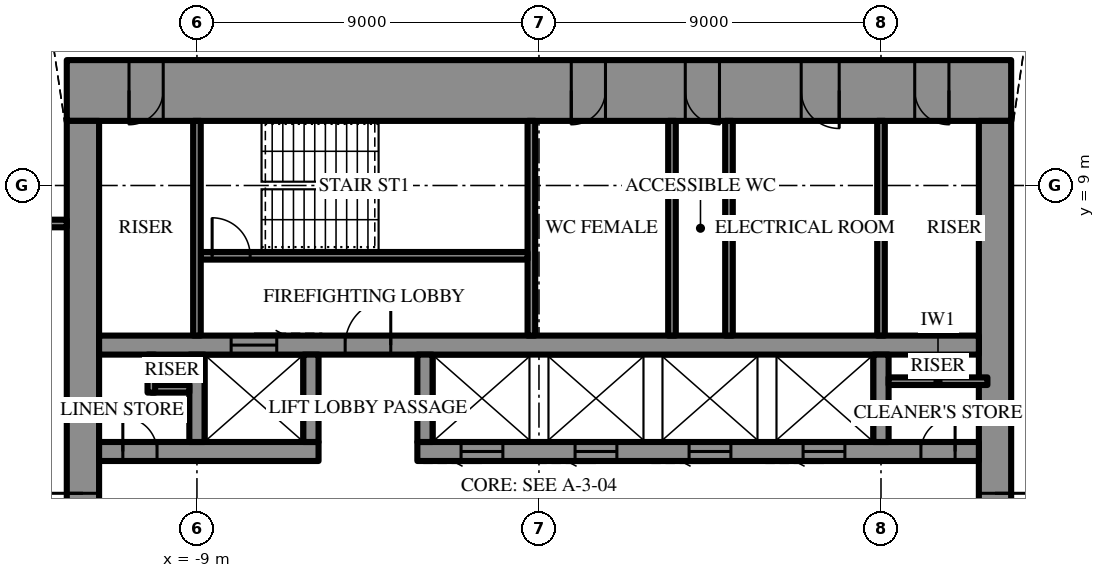
"""IFC4 building model, lengths in metres.
Left out: names, types, materials, properties, quantities, classifications, styles, units other than length and angle.
Written with IfcOpenShell. Run it as: python <this file> out.ifc"""

import sys

from ifc_helpers import new_model, si_unit, direction, frame, frame_2d, origin, place, context, subcontext, project, spatial, rectangle, extrude, element, fill, save


model = new_model("IFC4")
c1 = context("Model", 3, precision=1e-05, world=origin(), true_north=direction((0.0, 1.0)))
c2 = subcontext(c1, "Body", "Model", "MODEL_VIEW")
j1 = project(units=[si_unit("LENGTHUNIT", "METRE"), si_unit("PLANEANGLEUNIT", "RADIAN")], contexts=[c1])
p1 = place(None, origin())
s1 = spatial("IfcSite", under=j1, at=p1, CompositionType="ELEMENT")
p2 = place(p1, origin())
s2 = spatial("IfcBuilding", under=s1, at=p2, CompositionType="ELEMENT")
p3 = place(p2, frame((0.0, 0.0, 382.9)))
s3 = spatial("IfcBuildingStorey", under=s2, at=p3, CompositionType="ELEMENT", Elevation=382.9)
p4 = place(p3, frame((-12.425, 11.5, 0.0), z_axis=(0.0, 0.0, 1.0), x_axis=(1.0, 0.0, 0.0)))
e1 = element("IfcWall", 1, at=p4, inside=s3, PredefinedType="SHEAR", context=c2, shape_type="SweptSolid", body=[
    extrude(rectangle(XDim=24.85, YDim=1.6, at=frame_2d((12.425, 0.0))), origin(), (0.0, 0.0, 1.0), 4.2),
])
p5 = place(p4, frame((13.275, 0.0, 0.0)))
e2 = element("IfcOpeningElement", 2, at=p5, cuts=e1, PredefinedType="OPENING", context=c2, shape_type="SweptSolid", body=[
    extrude(rectangle(XDim=0.9, YDim=2.2, at=frame_2d((0.45, 1.1))), frame((0.0, 0.81, 0.0), z_axis=(0.0, -1.0, 0.0), x_axis=(1.0, 0.0, 0.0)), (0.0, 0.0, 1.0), 1.62),
])
p6 = place(p4, frame((16.275, 0.0, 0.0)))
e3 = element("IfcOpeningElement", 3, at=p6, cuts=e1, PredefinedType="OPENING", context=c2, shape_type="SweptSolid", body=[
    extrude(rectangle(XDim=0.9, YDim=2.2, at=frame_2d((0.45, 1.1))), frame((0.0, 0.81, 0.0), z_axis=(0.0, -1.0, 0.0), x_axis=(1.0, 0.0, 0.0)), (0.0, 0.0, 1.0), 1.62),
])
p7 = place(p4, frame((19.325, 0.0, 0.0)))
e4 = element("IfcOpeningElement", 4, at=p7, cuts=e1, PredefinedType="OPENING", context=c2, shape_type="SweptSolid", body=[
    extrude(rectangle(XDim=1.0, YDim=2.2, at=frame_2d((0.5, 1.1))), frame((0.0, 0.81, 0.0), z_axis=(0.0, -1.0, 0.0), x_axis=(1.0, 0.0, 0.0)), (0.0, 0.0, 1.0), 1.62),
])
p8 = place(p4, frame((1.637, 0.0, 0.0)))
e5 = element("IfcOpeningElement", 5, at=p8, cuts=e1, PredefinedType="OPENING", context=c2, shape_type="SweptSolid", body=[
    extrude(rectangle(XDim=0.9, YDim=2.2, at=frame_2d((0.45, 1.1))), frame((0.0, 0.81, 0.0), z_axis=(0.0, -1.0, 0.0), x_axis=(1.0, 0.0, 0.0)), (0.0, 0.0, 1.0), 1.62),
])
p9 = place(p4, frame((22.312, 0.0, 0.0)))
e6 = element("IfcOpeningElement", 6, at=p9, cuts=e1, PredefinedType="OPENING", context=c2, shape_type="SweptSolid", body=[
    extrude(rectangle(XDim=0.9, YDim=2.2, at=frame_2d((0.45, 1.1))), frame((0.0, 0.81, 0.0), z_axis=(0.0, -1.0, 0.0), x_axis=(1.0, 0.0, 0.0)), (0.0, 0.0, 1.0), 1.62),
])
p10 = place(p3, frame((12.0, -10.7, 0.0), z_axis=(0.0, 0.0, 1.0), x_axis=(0.0, 1.0, 0.0)))
e7 = element("IfcWall", 7, at=p10, inside=s3, PredefinedType="SHEAR", context=c2, shape_type="SweptSolid", body=[
    extrude(rectangle(XDim=21.4, YDim=0.85, at=frame_2d((10.7, 0.0))), origin(), (0.0, 0.0, 1.0), 4.2),
])
p11 = place(p10, frame((9.8, 0.0, 0.0)))
e8 = element("IfcOpeningElement", 8, at=p11, cuts=e7, PredefinedType="OPENING", context=c2, shape_type="SweptSolid", body=[
    extrude(rectangle(XDim=1.8, YDim=2.4, at=frame_2d((0.9, 1.2))), frame((0.0, 0.435, 0.0), z_axis=(0.0, -1.0, 0.0), x_axis=(1.0, 0.0, 0.0)), (0.0, 0.0, 1.0), 0.87),
])
p12 = place(p3, frame((-12.0, 10.7, 0.0), z_axis=(0.0, 0.0, 1.0), x_axis=(0.0, -1.0, 0.0)))
e9 = element("IfcWall", 9, at=p12, inside=s3, PredefinedType="SHEAR", context=c2, shape_type="SweptSolid", body=[
    extrude(rectangle(XDim=21.4, YDim=0.85, at=frame_2d((10.7, 0.0))), origin(), (0.0, 0.0, 1.0), 4.2),
])
p13 = place(p12, frame((9.8, 0.0, 0.0)))
e10 = element("IfcOpeningElement", 10, at=p13, cuts=e9, PredefinedType="OPENING", context=c2, shape_type="SweptSolid", body=[
    extrude(rectangle(XDim=1.8, YDim=2.4, at=frame_2d((0.9, 1.2))), frame((0.0, 0.435, 0.0), z_axis=(0.0, -1.0, 0.0), x_axis=(1.0, 0.0, 0.0)), (0.0, 0.0, 1.0), 0.87),
])
p14 = place(p3, frame((-11.575, 2.0, 0.0), z_axis=(0.0, 0.0, 1.0), x_axis=(1.0, 0.0, 0.0)))
e11 = element("IfcWall", 11, at=p14, inside=s3, PredefinedType="SHEAR", context=c2, shape_type="SweptSolid", body=[
    extrude(rectangle(XDim=5.775, YDim=0.5, at=frame_2d((2.887, 0.0))), origin(), (0.0, 0.0, 1.0), 4.2),
])
p15 = place(p14, frame((0.625, 0.0, 0.0)))
e12 = element("IfcOpeningElement", 12, at=p15, cuts=e11, PredefinedType="OPENING", context=c2, shape_type="SweptSolid", body=[
    extrude(rectangle(XDim=0.9, YDim=2.2, at=frame_2d((0.45, 1.1))), frame((0.0, 0.26, 0.0), z_axis=(0.0, -1.0, 0.0), x_axis=(1.0, 0.0, 0.0)), (0.0, 0.0, 1.0), 0.52),
])
p16 = place(p3, frame((-3.2, 2.0, 0.0), z_axis=(0.0, 0.0, 1.0), x_axis=(1.0, 0.0, 0.0)))
e13 = element("IfcWall", 13, at=p16, inside=s3, PredefinedType="SHEAR", context=c2, shape_type="SweptSolid", body=[
    extrude(rectangle(XDim=14.775, YDim=0.5, at=frame_2d((7.387, 0.0))), origin(), (0.0, 0.0, 1.0), 4.2),
])
p17 = place(p16, frame((13.25, 0.0, 0.0)))
e14 = element("IfcOpeningElement", 14, at=p17, cuts=e13, PredefinedType="OPENING", context=c2, shape_type="SweptSolid", body=[
    extrude(rectangle(XDim=0.9, YDim=2.2, at=frame_2d((0.45, 1.1))), frame((0.0, 0.26, 0.0), z_axis=(0.0, -1.0, 0.0), x_axis=(1.0, 0.0, 0.0)), (0.0, 0.0, 1.0), 0.52),
])
p18 = place(p16, frame((1.15, 0.0, 0.0)))
e15 = element("IfcOpeningElement", 15, at=p18, cuts=e13, PredefinedType="OPENING", context=c2, shape_type="SweptSolid", body=[
    extrude(rectangle(XDim=1.1, YDim=2.2, at=frame_2d((0.55, 1.1))), frame((0.0, 0.26, 0.0), z_axis=(0.0, -1.0, 0.0), x_axis=(1.0, 0.0, 0.0)), (0.0, 0.0, 1.0), 0.52),
])
p19 = place(p16, frame((4.15, 0.0, 0.0)))
e16 = element("IfcOpeningElement", 16, at=p19, cuts=e13, PredefinedType="OPENING", context=c2, shape_type="SweptSolid", body=[
    extrude(rectangle(XDim=1.1, YDim=2.2, at=frame_2d((0.55, 1.1))), frame((0.0, 0.26, 0.0), z_axis=(0.0, -1.0, 0.0), x_axis=(1.0, 0.0, 0.0)), (0.0, 0.0, 1.0), 0.52),
])
p20 = place(p16, frame((7.15, 0.0, 0.0)))
e17 = element("IfcOpeningElement", 17, at=p20, cuts=e13, PredefinedType="OPENING", context=c2, shape_type="SweptSolid", body=[
    extrude(rectangle(XDim=1.1, YDim=2.2, at=frame_2d((0.55, 1.1))), frame((0.0, 0.26, 0.0), z_axis=(0.0, -1.0, 0.0), x_axis=(1.0, 0.0, 0.0)), (0.0, 0.0, 1.0), 0.52),
])
p21 = place(p16, frame((10.15, 0.0, 0.0)))
e18 = element("IfcOpeningElement", 18, at=p21, cuts=e13, PredefinedType="OPENING", context=c2, shape_type="SweptSolid", body=[
    extrude(rectangle(XDim=1.1, YDim=2.2, at=frame_2d((0.55, 1.1))), frame((0.0, 0.26, 0.0), z_axis=(0.0, -1.0, 0.0), x_axis=(1.0, 0.0, 0.0)), (0.0, 0.0, 1.0), 0.52),
])
p22 = place(p3, frame((-11.575, 4.8, 0.0), z_axis=(0.0, 0.0, 1.0), x_axis=(1.0, 0.0, 0.0)))
e19 = element("IfcWall", 19, at=p22, inside=s3, PredefinedType="SHEAR", context=c2, shape_type="SweptSolid", body=[
    extrude(rectangle(XDim=23.15, YDim=0.5, at=frame_2d((11.575, 0.0))), origin(), (0.0, 0.0, 1.0), 4.2),
])
p23 = place(p22, frame((6.475, 0.0, 0.0)))
e20 = element("IfcOpeningElement", 20, at=p23, cuts=e19, PredefinedType="OPENING", context=c2, shape_type="SweptSolid", body=[
    extrude(rectangle(XDim=1.2, YDim=2.2, at=frame_2d((0.6, 1.1))), frame((0.0, 0.26, 0.0), z_axis=(0.0, -1.0, 0.0), x_axis=(1.0, 0.0, 0.0)), (0.0, 0.0, 1.0), 0.52),
])
p24 = place(p22, frame((3.475, 0.0, 0.0)))
e21 = element("IfcOpeningElement", 21, at=p24, cuts=e19, PredefinedType="OPENING", context=c2, shape_type="SweptSolid", body=[
    extrude(rectangle(XDim=1.2, YDim=2.2, at=frame_2d((0.6, 1.1))), frame((0.0, 0.26, 0.0), z_axis=(0.0, -1.0, 0.0), x_axis=(1.0, 0.0, 0.0)), (0.0, 0.0, 1.0), 0.52),
])
for number, where, z_axis, x_axis in (
    (22, (-9.0, 2.25, 0.0), (0.0, 0.0, 1.0), (0.0, 1.0, 0.0)),
    (23, (-6.0, 2.25, 0.0), (0.0, 0.0, 1.0), (0.0, 1.0, 0.0)),
    (24, (-3.0, 2.25, 0.0), (0.0, 0.0, 1.0), (0.0, 1.0, 0.0)),
    (25, (9.0, 2.25, 0.0), (0.0, 0.0, 1.0), (0.0, 1.0, 0.0)),
):
    element("IfcWall", number, at=place(p3, frame(where, z_axis=z_axis, x_axis=x_axis)), inside=s3, PredefinedType="SHEAR", context=c2, shape_type="SweptSolid", body=[
        extrude(rectangle(XDim=2.3, YDim=0.4, at=frame_2d((1.15, 0.0))), origin(), (0.0, 0.0, 1.0), 4.2),
    ])
p25 = place(p3, frame((-0.2, 5.05, 0.0), z_axis=(0.0, 0.0, 1.0), x_axis=(0.0, 1.0, 0.0)))
e26 = element("IfcWall", 26, at=p25, inside=s3, PredefinedType="SHEAR", context=c2, shape_type="SweptSolid", body=[
    extrude(rectangle(XDim=5.65, YDim=0.2, at=frame_2d((2.825, 0.0))), origin(), (0.0, 0.0, 1.0), 4.2),
])
p26 = place(p3, frame((-8.9, 7.15, 0.0), z_axis=(0.0, 0.0, 1.0), x_axis=(1.0, 0.0, 0.0)))
e27 = element("IfcWall", 27, at=p26, inside=s3, PredefinedType="SHEAR", context=c2, shape_type="SweptSolid", body=[
    extrude(rectangle(XDim=8.6, YDim=0.2, at=frame_2d((4.3, 0.0))), origin(), (0.0, 0.0, 1.0), 4.2),
])
p27 = place(p26, frame((0.3, 0.0, 0.0)))
e28 = element("IfcOpeningElement", 28, at=p27, cuts=e27, PredefinedType="OPENING", context=c2, shape_type="SweptSolid", body=[
    extrude(rectangle(XDim=1.0, YDim=2.2, at=frame_2d((0.5, 1.1))), frame((0.0, 0.11, 0.0), z_axis=(0.0, -1.0, 0.0), x_axis=(1.0, 0.0, 0.0)), (0.0, 0.0, 1.0), 0.22),
])
for number, where, z_axis, x_axis in (
    (29, (-9.0, 5.05, 0.0), (0.0, 0.0, 1.0), (0.0, 1.0, 0.0)),
    (30, (9.0, 5.05, 0.0), (0.0, 0.0, 1.0), (0.0, 1.0, 0.0)),
    (31, (3.5, 5.05, 0.0), (0.0, 0.0, 1.0), (0.0, 1.0, 0.0)),
    (32, (5.0, 5.05, 0.0), (0.0, 0.0, 1.0), (0.0, 1.0, 0.0)),
):
    element("IfcWall", number, at=place(p3, frame(where, z_axis=z_axis, x_axis=x_axis)), inside=s3, PredefinedType="PARTITIONING", context=c2, shape_type="SweptSolid", body=[
        extrude(rectangle(XDim=5.65, YDim=0.2, at=frame_2d((2.825, 0.0))), origin(), (0.0, 0.0, 1.0), 4.0),
    ])
for number, where, z_axis, x_axis in (
    (33, (-10.2, 3.65, 0.0), (0.0, 0.0, 1.0), (1.0, 0.0, 0.0)),
    (34, (-10.2, 3.55, 0.0), (0.0, 0.0, 1.0), (0.0, 1.0, 0.0)),
):
    element("IfcWall", number, at=place(p3, frame(where, z_axis=z_axis, x_axis=x_axis)), inside=s3, PredefinedType="PARTITIONING", context=c2, shape_type="SweptSolid", body=[
        extrude(rectangle(XDim=1.0, YDim=0.2, at=frame_2d((0.5, 0.0))), origin(), (0.0, 0.0, 1.0), 4.0),
    ])
p28 = place(p3, frame((9.2, 3.85, 0.0), z_axis=(0.0, 0.0, 1.0), x_axis=(1.0, 0.0, 0.0)))
e35 = element("IfcWall", 35, at=p28, inside=s3, PredefinedType="PARTITIONING", context=c2, shape_type="SweptSolid", body=[
    extrude(rectangle(XDim=2.6, YDim=0.2, at=frame_2d((1.3, 0.0))), origin(), (0.0, 0.0, 1.0), 4.0),
])
p29 = place(p3, frame((-12.425, 8.0, 0.0), z_axis=(0.0, 0.0, 1.0), x_axis=(-1.0, 0.0, 0.0)))
e36 = element("IfcWall", 36, at=p29, inside=s3, PredefinedType="PARTITIONING", context=c2, shape_type="SweptSolid", body=[
    extrude(rectangle(XDim=13.59, YDim=0.2, at=frame_2d((6.795, 0.0))), origin(), (0.0, 0.0, 1.0), 4.0),
])
p30 = place(p29, frame((0.859, 0.0, 0.0)))
e37 = element("IfcOpeningElement", 37, at=p30, cuts=e36, PredefinedType="OPENING", context=c2, shape_type="SweptSolid", body=[
    extrude(rectangle(XDim=1.0, YDim=2.2, at=frame_2d((0.5, 1.1))), frame((0.0, 0.11, 0.0), z_axis=(0.0, -1.0, 0.0), x_axis=(1.0, 0.0, 0.0)), (0.0, 0.0, 1.0), 0.22),
])
p31 = place(p11, frame((1.8, 0.0, 0.0), z_axis=(0.0, 0.0, 1.0), x_axis=(-1.0, 0.0, 0.0)))
e38 = element("IfcDoor", 38, at=p31, inside=s3, OperationType="DOUBLE_DOOR_SINGLE_SWING", PredefinedType="DOOR", context=c2, shape_type="SweptSolid", body=[
    extrude(rectangle(XDim=1.8, YDim=2.4, at=frame_2d((0.9, 1.2))), frame((0.0, 0.025, 0.0), z_axis=(0.0, -1.0, 0.0), x_axis=(1.0, 0.0, 0.0)), (0.0, 0.0, 1.0), 0.05),
])
fill(e8, e38)
p32 = place(p13, frame((1.8, 0.0, 0.0), z_axis=(0.0, 0.0, 1.0), x_axis=(-1.0, 0.0, 0.0)))
e39 = element("IfcDoor", 39, at=p32, inside=s3, OperationType="DOUBLE_DOOR_SINGLE_SWING", PredefinedType="DOOR", context=c2, shape_type="SweptSolid", body=[
    extrude(rectangle(XDim=1.8, YDim=2.4, at=frame_2d((0.9, 1.2))), frame((0.0, 0.025, 0.0), z_axis=(0.0, -1.0, 0.0), x_axis=(1.0, 0.0, 0.0)), (0.0, 0.0, 1.0), 0.05),
])
fill(e10, e39)
p33 = place(p23, origin())
e40 = element("IfcDoor", 40, at=p33, inside=s3, OperationType="SINGLE_SWING_LEFT", PredefinedType="DOOR", context=c2, shape_type="SweptSolid", body=[
    extrude(rectangle(XDim=1.2, YDim=2.2, at=frame_2d((0.6, 1.1))), frame((0.0, 0.025, 0.0), z_axis=(0.0, -1.0, 0.0), x_axis=(1.0, 0.0, 0.0)), (0.0, 0.0, 1.0), 0.05),
])
fill(e20, e40)
p34 = place(p27, origin())
e41 = element("IfcDoor", 41, at=p34, inside=s3, OperationType="SINGLE_SWING_RIGHT", PredefinedType="DOOR", context=c2, shape_type="SweptSolid", body=[
    extrude(rectangle(XDim=1.0, YDim=2.2, at=frame_2d((0.5, 1.1))), frame((0.0, 0.025, 0.0), z_axis=(0.0, -1.0, 0.0), x_axis=(1.0, 0.0, 0.0)), (0.0, 0.0, 1.0), 0.05),
])
fill(e28, e41)
p35 = place(p5, frame((0.9, 0.0, 0.0), z_axis=(0.0, 0.0, 1.0), x_axis=(-1.0, 0.0, 0.0)))
e42 = element("IfcDoor", 42, at=p35, inside=s3, OperationType="SINGLE_SWING_LEFT", PredefinedType="DOOR", context=c2, shape_type="SweptSolid", body=[
    extrude(rectangle(XDim=0.9, YDim=2.2, at=frame_2d((0.45, 1.1))), frame((0.0, 0.025, 0.0), z_axis=(0.0, -1.0, 0.0), x_axis=(1.0, 0.0, 0.0)), (0.0, 0.0, 1.0), 0.05),
])
fill(e2, e42)
p36 = place(p6, frame((0.9, 0.0, 0.0), z_axis=(0.0, 0.0, 1.0), x_axis=(-1.0, 0.0, 0.0)))
e43 = element("IfcDoor", 43, at=p36, inside=s3, OperationType="SINGLE_SWING_RIGHT", PredefinedType="DOOR", context=c2, shape_type="SweptSolid", body=[
    extrude(rectangle(XDim=0.9, YDim=2.2, at=frame_2d((0.45, 1.1))), frame((0.0, 0.025, 0.0), z_axis=(0.0, -1.0, 0.0), x_axis=(1.0, 0.0, 0.0)), (0.0, 0.0, 1.0), 0.05),
])
fill(e3, e43)
p37 = place(p7, frame((1.0, 0.0, 0.0), z_axis=(0.0, 0.0, 1.0), x_axis=(-1.0, 0.0, 0.0)))
e44 = element("IfcDoor", 44, at=p37, inside=s3, OperationType="SINGLE_SWING_RIGHT", PredefinedType="DOOR", context=c2, shape_type="SweptSolid", body=[
    extrude(rectangle(XDim=1.0, YDim=2.2, at=frame_2d((0.5, 1.1))), frame((0.0, 0.025, 0.0), z_axis=(0.0, -1.0, 0.0), x_axis=(1.0, 0.0, 0.0)), (0.0, 0.0, 1.0), 0.05),
])
fill(e4, e44)
p38 = place(p8, frame((0.9, 0.0, 0.0), z_axis=(0.0, 0.0, 1.0), x_axis=(-1.0, 0.0, 0.0)))
e45 = element("IfcDoor", 45, at=p38, inside=s3, OperationType="SINGLE_SWING_LEFT", PredefinedType="DOOR", context=c2, shape_type="SweptSolid", body=[
    extrude(rectangle(XDim=0.9, YDim=2.2, at=frame_2d((0.45, 1.1))), frame((0.0, 0.025, 0.0), z_axis=(0.0, -1.0, 0.0), x_axis=(1.0, 0.0, 0.0)), (0.0, 0.0, 1.0), 0.05),
])
fill(e5, e45)
p39 = place(p9, frame((0.9, 0.0, 0.0), z_axis=(0.0, 0.0, 1.0), x_axis=(-1.0, 0.0, 0.0)))
e46 = element("IfcDoor", 46, at=p39, inside=s3, OperationType="SINGLE_SWING_RIGHT", PredefinedType="DOOR", context=c2, shape_type="SweptSolid", body=[
    extrude(rectangle(XDim=0.9, YDim=2.2, at=frame_2d((0.45, 1.1))), frame((0.0, 0.025, 0.0), z_axis=(0.0, -1.0, 0.0), x_axis=(1.0, 0.0, 0.0)), (0.0, 0.0, 1.0), 0.05),
])
fill(e6, e46)
p40 = place(p15, origin())
e47 = element("IfcDoor", 47, at=p40, inside=s3, OperationType="SINGLE_SWING_RIGHT", PredefinedType="DOOR", context=c2, shape_type="SweptSolid", body=[
    extrude(rectangle(XDim=0.9, YDim=2.2, at=frame_2d((0.45, 1.1))), frame((0.0, 0.025, 0.0), z_axis=(0.0, -1.0, 0.0), x_axis=(1.0, 0.0, 0.0)), (0.0, 0.0, 1.0), 0.05),
])
fill(e12, e47)
p41 = place(p17, origin())
e48 = element("IfcDoor", 48, at=p41, inside=s3, OperationType="SINGLE_SWING_LEFT", PredefinedType="DOOR", context=c2, shape_type="SweptSolid", body=[
    extrude(rectangle(XDim=0.9, YDim=2.2, at=frame_2d((0.45, 1.1))), frame((0.0, 0.025, 0.0), z_axis=(0.0, -1.0, 0.0), x_axis=(1.0, 0.0, 0.0)), (0.0, 0.0, 1.0), 0.05),
])
fill(e14, e48)
p42 = place(p24, origin())
e49 = element("IfcDoor", 49, at=p42, inside=s3, OperationType="SLIDING_TO_LEFT", PredefinedType="DOOR", context=c2, shape_type="SweptSolid", body=[
    extrude(rectangle(XDim=1.2, YDim=2.2, at=frame_2d((0.6, 1.1))), frame((0.0, 0.025, 0.0), z_axis=(0.0, -1.0, 0.0), x_axis=(1.0, 0.0, 0.0)), (0.0, 0.0, 1.0), 0.05),
])
fill(e21, e49)
p43 = place(p18, frame((1.1, 0.0, 0.0), z_axis=(0.0, 0.0, 1.0), x_axis=(-1.0, 0.0, 0.0)))
e50 = element("IfcDoor", 50, at=p43, inside=s3, OperationType="SLIDING_TO_LEFT", PredefinedType="DOOR", context=c2, shape_type="SweptSolid", body=[
    extrude(rectangle(XDim=1.1, YDim=2.2, at=frame_2d((0.55, 1.1))), frame((0.0, 0.025, 0.0), z_axis=(0.0, -1.0, 0.0), x_axis=(1.0, 0.0, 0.0)), (0.0, 0.0, 1.0), 0.05),
])
fill(e15, e50)
p44 = place(p19, frame((1.1, 0.0, 0.0), z_axis=(0.0, 0.0, 1.0), x_axis=(-1.0, 0.0, 0.0)))
e51 = element("IfcDoor", 51, at=p44, inside=s3, OperationType="SLIDING_TO_LEFT", PredefinedType="DOOR", context=c2, shape_type="SweptSolid", body=[
    extrude(rectangle(XDim=1.1, YDim=2.2, at=frame_2d((0.55, 1.1))), frame((0.0, 0.025, 0.0), z_axis=(0.0, -1.0, 0.0), x_axis=(1.0, 0.0, 0.0)), (0.0, 0.0, 1.0), 0.05),
])
fill(e16, e51)
p45 = place(p20, frame((1.1, 0.0, 0.0), z_axis=(0.0, 0.0, 1.0), x_axis=(-1.0, 0.0, 0.0)))
e52 = element("IfcDoor", 52, at=p45, inside=s3, OperationType="SLIDING_TO_LEFT", PredefinedType="DOOR", context=c2, shape_type="SweptSolid", body=[
    extrude(rectangle(XDim=1.1, YDim=2.2, at=frame_2d((0.55, 1.1))), frame((0.0, 0.025, 0.0), z_axis=(0.0, -1.0, 0.0), x_axis=(1.0, 0.0, 0.0)), (0.0, 0.0, 1.0), 0.05),
])
fill(e17, e52)
p46 = place(p21, frame((1.1, 0.0, 0.0), z_axis=(0.0, 0.0, 1.0), x_axis=(-1.0, 0.0, 0.0)))
e53 = element("IfcDoor", 53, at=p46, inside=s3, OperationType="SLIDING_TO_LEFT", PredefinedType="DOOR", context=c2, shape_type="SweptSolid", body=[
    extrude(rectangle(XDim=1.1, YDim=2.2, at=frame_2d((0.55, 1.1))), frame((0.0, 0.025, 0.0), z_axis=(0.0, -1.0, 0.0), x_axis=(1.0, 0.0, 0.0)), (0.0, 0.0, 1.0), 0.05),
])
fill(e18, e53)
save(model, sys.argv[1])
